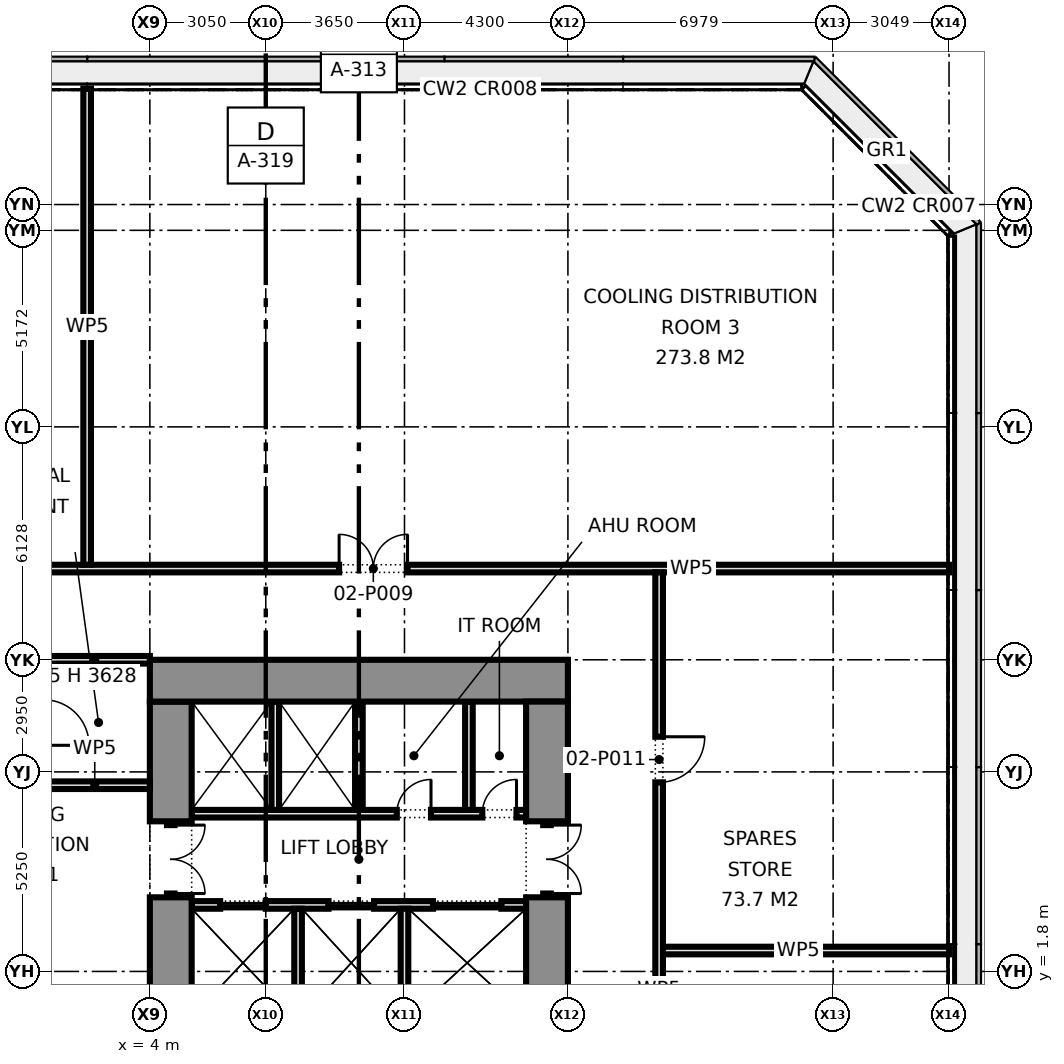
"""IFC4 building model, lengths in metres.
Left out: names, types, materials, properties, quantities, classifications, styles, units other than length and angle.
Written with IfcOpenShell. Run it as: python <this file> out.ifc"""

import sys

from ifc_helpers import new_model, si_unit, direction, frame, frame_2d, origin, place, context, subcontext, project, spatial, rectangle, extrude, element, fill, save


model = new_model("IFC4")
c1 = context("Model", 3, precision=1e-05, world=origin(), true_north=direction((0.0, 1.0)))
c2 = subcontext(c1, "Body", "Model", "MODEL_VIEW")
j1 = project(units=[si_unit("LENGTHUNIT", "METRE"), si_unit("PLANEANGLEUNIT", "RADIAN")], contexts=[c1])
p1 = place(None, origin())
s1 = spatial("IfcSite", under=j1, at=p1, CompositionType="ELEMENT")
p2 = place(p1, origin())
s2 = spatial("IfcBuilding", under=s1, at=p2, CompositionType="ELEMENT")
p3 = place(p2, frame((0.0, 0.0, 6.5)))
s3 = spatial("IfcBuildingStorey", under=s2, at=p3, CompositionType="ELEMENT", Elevation=6.5)
p4 = place(p3, frame((15.0, 9.45, 0.0), z_axis=(0.0, 0.0, 1.0), x_axis=(-1.0, 0.0, 0.0)))
e1 = element("IfcWall", 1, at=p4, inside=s3, PredefinedType="SHEAR", context=c2, shape_type="SweptSolid", body=[
    extrude(rectangle(XDim=11.0, YDim=1.1, at=frame_2d((5.5, 0.0))), origin(), (0.0, 0.0, 1.0), 4.575),
])
p5 = place(p3, frame((14.45, 8.9, 0.0), z_axis=(0.0, 0.0, 1.0), x_axis=(0.0, -1.0, 0.0)))
e2 = element("IfcWall", 2, at=p5, inside=s3, PredefinedType="SHEAR", context=c2, shape_type="SweptSolid", body=[
    extrude(rectangle(XDim=3.15, YDim=1.1, at=frame_2d((1.575, 0.0))), origin(), (0.0, 0.0, 1.0), 4.575),
])
p6 = place(p3, frame((14.45, 5.75, 0.0), z_axis=(0.0, 0.0, 1.0), x_axis=(0.0, -1.0, 0.0)))
e3 = element("IfcWall", 3, at=p6, inside=s3, PredefinedType="PARTITIONING", context=c2, shape_type="SweptSolid", body=[
    extrude(rectangle(XDim=2.0, YDim=0.2, at=frame_2d((1.0, 0.0))), origin(), (0.0, 0.0, 1.0), 2.4),
])
p7 = place(p6, frame((0.1, 0.0, 0.0)))
e4 = element("IfcOpeningElement", 4, at=p7, cuts=e3, PredefinedType="OPENING", context=c2, shape_type="SweptSolid", body=[
    extrude(rectangle(XDim=1.8, YDim=2.1, at=frame_2d((0.9, 1.05))), frame((0.0, 0.11, 0.0), z_axis=(0.0, -1.0, 0.0), x_axis=(1.0, 0.0, 0.0)), (0.0, 0.0, 1.0), 0.22),
])
p8 = place(p3, frame((14.45, 3.75, 0.0), z_axis=(0.0, 0.0, 1.0), x_axis=(0.0, -1.0, 0.0)))
e5 = element("IfcWall", 5, at=p8, inside=s3, PredefinedType="SHEAR", context=c2, shape_type="SweptSolid", body=[
    extrude(rectangle(XDim=6.13, YDim=1.1, at=frame_2d((3.065, 0.0))), origin(), (0.0, 0.0, 1.0), 4.575),
])
p9 = place(p3, frame((4.55, 8.9, 0.0), z_axis=(0.0, 0.0, 1.0), x_axis=(0.0, -1.0, 0.0)))
e6 = element("IfcWall", 6, at=p9, inside=s3, PredefinedType="SHEAR", context=c2, shape_type="SweptSolid", body=[
    extrude(rectangle(XDim=3.15, YDim=1.1, at=frame_2d((1.575, 0.0))), origin(), (0.0, 0.0, 1.0), 4.575),
])
p10 = place(p3, frame((4.55, 5.75, 0.0), z_axis=(0.0, 0.0, 1.0), x_axis=(0.0, -1.0, 0.0)))
e7 = element("IfcWall", 7, at=p10, inside=s3, PredefinedType="PARTITIONING", context=c2, shape_type="SweptSolid", body=[
    extrude(rectangle(XDim=2.0, YDim=0.2, at=frame_2d((1.0, 0.0))), origin(), (0.0, 0.0, 1.0), 2.4),
])
p11 = place(p10, frame((0.1, 0.0, 0.0)))
e8 = element("IfcOpeningElement", 8, at=p11, cuts=e7, PredefinedType="OPENING", context=c2, shape_type="SweptSolid", body=[
    extrude(rectangle(XDim=1.8, YDim=2.1, at=frame_2d((0.9, 1.05))), frame((0.0, 0.11, 0.0), z_axis=(0.0, -1.0, 0.0), x_axis=(1.0, 0.0, 0.0)), (0.0, 0.0, 1.0), 0.22),
])
p12 = place(p3, frame((4.55, 3.75, 0.0), z_axis=(0.0, 0.0, 1.0), x_axis=(0.0, -1.0, 0.0)))
e9 = element("IfcWall", 9, at=p12, inside=s3, PredefinedType="SHEAR", context=c2, shape_type="SweptSolid", body=[
    extrude(rectangle(XDim=4.0, YDim=1.1, at=frame_2d((2.0, 0.0))), origin(), (0.0, 0.0, 1.0), 4.575),
])
p13 = place(p3, frame((13.9, 5.95, 0.0), z_axis=(0.0, 0.0, 1.0), x_axis=(-1.0, 0.0, 0.0)))
e10 = element("IfcWall", 10, at=p13, inside=s3, PredefinedType="PARTITIONING", context=c2, shape_type="SweptSolid", body=[
    extrude(rectangle(XDim=8.8, YDim=0.2, at=frame_2d((4.4, 0.0))), origin(), (0.0, 0.0, 1.0), 4.575),
])
p14 = place(p13, frame((0.252, 0.0, 0.0)))
e11 = element("IfcOpeningElement", 11, at=p14, cuts=e10, PredefinedType="OPENING", context=c2, shape_type="SweptSolid", body=[
    extrude(rectangle(XDim=0.9, YDim=2.1, at=frame_2d((0.45, 1.05))), frame((0.0, 0.11, 0.0), z_axis=(0.0, -1.0, 0.0), x_axis=(1.0, 0.0, 0.0)), (0.0, 0.0, 1.0), 0.22),
])
p15 = place(p13, frame((2.502, 0.0, 0.0)))
e12 = element("IfcOpeningElement", 12, at=p15, cuts=e10, PredefinedType="OPENING", context=c2, shape_type="SweptSolid", body=[
    extrude(rectangle(XDim=0.9, YDim=2.1, at=frame_2d((0.45, 1.05))), frame((0.0, 0.11, 0.0), z_axis=(0.0, -1.0, 0.0), x_axis=(1.0, 0.0, 0.0)), (0.0, 0.0, 1.0), 0.22),
])
p16 = place(p3, frame((13.9, 3.55, 0.0), z_axis=(0.0, 0.0, 1.0), x_axis=(-1.0, 0.0, 0.0)))
e13 = element("IfcWall", 13, at=p16, inside=s3, PredefinedType="PARTITIONING", context=c2, shape_type="SweptSolid", body=[
    extrude(rectangle(XDim=8.8, YDim=0.2, at=frame_2d((4.4, 0.0))), origin(), (0.0, 0.0, 1.0), 4.575),
])
p17 = place(p16, frame((0.65, 0.0, 0.0)))
e14 = element("IfcOpeningElement", 14, at=p17, cuts=e13, PredefinedType="OPENING", context=c2, shape_type="SweptSolid", body=[
    extrude(rectangle(XDim=1.8, YDim=2.1, at=frame_2d((0.9, 1.05))), frame((0.0, 0.11, 0.0), z_axis=(0.0, -1.0, 0.0), x_axis=(1.0, 0.0, 0.0)), (0.0, 0.0, 1.0), 0.22),
])
p18 = place(p16, frame((4.0, 0.0, 0.0)))
e15 = element("IfcOpeningElement", 15, at=p18, cuts=e13, PredefinedType="OPENING", context=c2, shape_type="SweptSolid", body=[
    extrude(rectangle(XDim=1.2, YDim=2.1, at=frame_2d((0.6, 1.05))), frame((0.0, 0.11, 0.0), z_axis=(0.0, -1.0, 0.0), x_axis=(1.0, 0.0, 0.0)), (0.0, 0.0, 1.0), 0.22),
])
p19 = place(p16, frame((6.85, 0.0, 0.0)))
e16 = element("IfcOpeningElement", 16, at=p19, cuts=e13, PredefinedType="OPENING", context=c2, shape_type="SweptSolid", body=[
    extrude(rectangle(XDim=1.2, YDim=2.1, at=frame_2d((0.6, 1.05))), frame((0.0, 0.11, 0.0), z_axis=(0.0, -1.0, 0.0), x_axis=(1.0, 0.0, 0.0)), (0.0, 0.0, 1.0), 0.22),
])
for number, where, z_axis, x_axis in (
    (17, (9.5, 8.9, 0.0), (0.0, 0.0, 1.0), (0.0, -1.0, 0.0)),
    (18, (7.3, 8.9, 0.0), (0.0, 0.0, 1.0), (0.0, -1.0, 0.0)),
    (19, (12.395, 8.9, 0.0), (0.0, 0.0, 1.0), (0.0, -1.0, 0.0)),
    (20, (10.7, 3.45, 0.0), (0.0, 0.0, 1.0), (0.0, -1.0, 0.0)),
    (21, (7.9, 3.45, 0.0), (0.0, 0.0, 1.0), (0.0, -1.0, 0.0)),
):
    element("IfcWall", number, at=place(p3, frame(where, z_axis=z_axis, x_axis=x_axis)), inside=s3, PredefinedType="PARTITIONING", context=c2, shape_type="SweptSolid", body=[
        extrude(rectangle(XDim=2.85, YDim=0.2, at=frame_2d((1.425, 0.0))), origin(), (0.0, 0.0, 1.0), 4.575),
    ])
p20 = place(p3, frame((17.5, 2.35, 0.0), z_axis=(0.0, 0.0, 1.0), x_axis=(1.0, 0.0, 0.0)))
e22 = element("IfcWall", 22, at=p20, inside=s3, PredefinedType="PARTITIONING", context=c2, shape_type="SweptSolid", body=[
    extrude(rectangle(XDim=7.53, YDim=0.2, at=frame_2d((3.765, 0.0))), origin(), (0.0, 0.0, 1.0), 4.575),
])
p21 = place(p3, frame((1.1, 6.7, 0.0), z_axis=(0.0, 0.0, 1.0), x_axis=(1.0, 0.0, 0.0)))
e23 = element("IfcWall", 23, at=p21, inside=s3, PredefinedType="PARTITIONING", context=c2, shape_type="SweptSolid", body=[
    extrude(rectangle(XDim=2.9, YDim=0.2, at=frame_2d((1.45, 0.0))), origin(), (0.0, 0.0, 1.0), 4.575),
])
p22 = place(p3, frame((1.1, 10.0, 0.0), z_axis=(0.0, 0.0, 1.0), x_axis=(1.0, 0.0, 0.0)))
e24 = element("IfcWall", 24, at=p22, inside=s3, PredefinedType="PARTITIONING", context=c2, shape_type="SweptSolid", body=[
    extrude(rectangle(XDim=2.9, YDim=0.2, at=frame_2d((1.45, 0.0))), origin(), (0.0, 0.0, 1.0), 3.628),
])
p23 = place(p3, frame((-25.03, 12.4, 0.0), z_axis=(0.0, 0.0, 1.0), x_axis=(1.0, 0.0, 0.0)))
e25 = element("IfcWall", 25, at=p23, inside=s3, PredefinedType="PARTITIONING", context=c2, shape_type="SweptSolid", body=[
    extrude(rectangle(XDim=50.06, YDim=0.2, at=frame_2d((25.03, 0.0))), origin(), (0.0, 0.0, 1.0), 4.575),
])
p24 = place(p23, frame((21.18, 0.0, 0.0)))
e26 = element("IfcOpeningElement", 26, at=p24, cuts=e25, PredefinedType="OPENING", context=c2, shape_type="SweptSolid", body=[
    extrude(rectangle(XDim=1.8, YDim=2.1, at=frame_2d((0.9, 1.05))), frame((0.0, 0.11, 0.0), z_axis=(0.0, -1.0, 0.0), x_axis=(1.0, 0.0, 0.0)), (0.0, 0.0, 1.0), 0.22),
])
p25 = place(p23, frame((9.58, 0.0, 0.0)))
e27 = element("IfcOpeningElement", 27, at=p25, cuts=e25, PredefinedType="OPENING", context=c2, shape_type="SweptSolid", body=[
    extrude(rectangle(XDim=1.0, YDim=2.1, at=frame_2d((0.5, 1.05))), frame((0.0, 0.11, 0.0), z_axis=(0.0, -1.0, 0.0), x_axis=(1.0, 0.0, 0.0)), (0.0, 0.0, 1.0), 0.22),
])
p26 = place(p23, frame((12.58, 0.0, 0.0)))
e28 = element("IfcOpeningElement", 28, at=p26, cuts=e25, PredefinedType="OPENING", context=c2, shape_type="SweptSolid", body=[
    extrude(rectangle(XDim=1.0, YDim=2.1, at=frame_2d((0.5, 1.05))), frame((0.0, 0.11, 0.0), z_axis=(0.0, -1.0, 0.0), x_axis=(1.0, 0.0, 0.0)), (0.0, 0.0, 1.0), 0.22),
])
p27 = place(p23, frame((15.18, 0.0, 0.0)))
e29 = element("IfcOpeningElement", 29, at=p27, cuts=e25, PredefinedType="OPENING", context=c2, shape_type="SweptSolid", body=[
    extrude(rectangle(XDim=1.0, YDim=2.1, at=frame_2d((0.5, 1.05))), frame((0.0, 0.11, 0.0), z_axis=(0.0, -1.0, 0.0), x_axis=(1.0, 0.0, 0.0)), (0.0, 0.0, 1.0), 0.22),
])
p28 = place(p23, frame((34.01, 0.0, 0.0)))
e30 = element("IfcOpeningElement", 30, at=p28, cuts=e25, PredefinedType="OPENING", context=c2, shape_type="SweptSolid", body=[
    extrude(rectangle(XDim=1.8, YDim=2.1, at=frame_2d((0.9, 1.05))), frame((0.0, 0.11, 0.0), z_axis=(0.0, -1.0, 0.0), x_axis=(1.0, 0.0, 0.0)), (0.0, 0.0, 1.0), 0.22),
])
p29 = place(p3, frame((17.4, -12.3, 0.0), z_axis=(0.0, 0.0, 1.0), x_axis=(0.0, 1.0, 0.0)))
e31 = element("IfcWall", 31, at=p29, inside=s3, PredefinedType="PARTITIONING", context=c2, shape_type="SweptSolid", body=[
    extrude(rectangle(XDim=24.6, YDim=0.2, at=frame_2d((12.3, 0.0))), origin(), (0.0, 0.0, 1.0), 4.575),
])
p30 = place(p29, frame((6.375, 0.0, 0.0)))
e32 = element("IfcOpeningElement", 32, at=p30, cuts=e31, PredefinedType="OPENING", context=c2, shape_type="SweptSolid", body=[
    extrude(rectangle(XDim=1.8, YDim=2.1, at=frame_2d((0.9, 1.05))), frame((0.0, 0.11, 0.0), z_axis=(0.0, -1.0, 0.0), x_axis=(1.0, 0.0, 0.0)), (0.0, 0.0, 1.0), 0.22),
])
p31 = place(p29, frame((19.075, 0.0, 0.0)))
e33 = element("IfcOpeningElement", 33, at=p31, cuts=e31, PredefinedType="OPENING", context=c2, shape_type="SweptSolid", body=[
    extrude(rectangle(XDim=1.2, YDim=2.1, at=frame_2d((0.6, 1.05))), frame((0.0, 0.11, 0.0), z_axis=(0.0, -1.0, 0.0), x_axis=(1.0, 0.0, 0.0)), (0.0, 0.0, 1.0), 0.22),
])
p32 = place(p3, frame((2.35, 12.5, 0.0), z_axis=(0.0, 0.0, 1.0), x_axis=(0.0, 1.0, 0.0)))
e34 = element("IfcWall", 34, at=p32, inside=s3, PredefinedType="PARTITIONING", context=c2, shape_type="SweptSolid", body=[
    extrude(rectangle(XDim=12.53, YDim=0.2, at=frame_2d((6.265, 0.0))), origin(), (0.0, 0.0, 1.0), 4.575),
])
p33 = place(p7, origin())
e35 = element("IfcDoor", 35, at=p33, inside=s3, OperationType="DOUBLE_DOOR_SINGLE_SWING", PredefinedType="DOOR", context=c2, shape_type="SweptSolid", body=[
    extrude(rectangle(XDim=1.8, YDim=2.1, at=frame_2d((0.9, 1.05))), frame((0.0, 0.025, 0.0), z_axis=(0.0, -1.0, 0.0), x_axis=(1.0, 0.0, 0.0)), (0.0, 0.0, 1.0), 0.05),
])
fill(e4, e35)
p34 = place(p11, origin())
e36 = element("IfcDoor", 36, at=p34, inside=s3, OperationType="DOUBLE_DOOR_SINGLE_SWING", PredefinedType="DOOR", context=c2, shape_type="SweptSolid", body=[
    extrude(rectangle(XDim=1.8, YDim=2.1, at=frame_2d((0.9, 1.05))), frame((0.0, 0.025, 0.0), z_axis=(0.0, -1.0, 0.0), x_axis=(1.0, 0.0, 0.0)), (0.0, 0.0, 1.0), 0.05),
])
fill(e8, e36)
p35 = place(p17, origin())
e37 = element("IfcDoor", 37, at=p35, inside=s3, OperationType="DOUBLE_DOOR_SLIDING", PredefinedType="DOOR", context=c2, shape_type="SweptSolid", body=[
    extrude(rectangle(XDim=1.8, YDim=2.1, at=frame_2d((0.9, 1.05))), frame((0.0, 0.025, 0.0), z_axis=(0.0, -1.0, 0.0), x_axis=(1.0, 0.0, 0.0)), (0.0, 0.0, 1.0), 0.05),
])
fill(e14, e37)
p36 = place(p18, origin())
e38 = element("IfcDoor", 38, at=p36, inside=s3, OperationType="DOUBLE_DOOR_SLIDING", PredefinedType="DOOR", context=c2, shape_type="SweptSolid", body=[
    extrude(rectangle(XDim=1.2, YDim=2.1, at=frame_2d((0.6, 1.05))), frame((0.0, 0.025, 0.0), z_axis=(0.0, -1.0, 0.0), x_axis=(1.0, 0.0, 0.0)), (0.0, 0.0, 1.0), 0.05),
])
fill(e15, e38)
p37 = place(p19, origin())
e39 = element("IfcDoor", 39, at=p37, inside=s3, OperationType="DOUBLE_DOOR_SLIDING", PredefinedType="DOOR", context=c2, shape_type="SweptSolid", body=[
    extrude(rectangle(XDim=1.2, YDim=2.1, at=frame_2d((0.6, 1.05))), frame((0.0, 0.025, 0.0), z_axis=(0.0, -1.0, 0.0), x_axis=(1.0, 0.0, 0.0)), (0.0, 0.0, 1.0), 0.05),
])
fill(e16, e39)
p38 = place(p14, frame((0.9, 0.0, 0.0), z_axis=(0.0, 0.0, 1.0), x_axis=(-1.0, 0.0, 0.0)))
e40 = element("IfcDoor", 40, at=p38, inside=s3, OperationType="SINGLE_SWING_RIGHT", PredefinedType="DOOR", context=c2, shape_type="SweptSolid", body=[
    extrude(rectangle(XDim=0.9, YDim=2.1, at=frame_2d((0.45, 1.05))), frame((0.0, 0.025, 0.0), z_axis=(0.0, -1.0, 0.0), x_axis=(1.0, 0.0, 0.0)), (0.0, 0.0, 1.0), 0.05),
])
fill(e11, e40)
p39 = place(p15, frame((0.9, 0.0, 0.0), z_axis=(0.0, 0.0, 1.0), x_axis=(-1.0, 0.0, 0.0)))
e41 = element("IfcDoor", 41, at=p39, inside=s3, OperationType="SINGLE_SWING_RIGHT", PredefinedType="DOOR", context=c2, shape_type="SweptSolid", body=[
    extrude(rectangle(XDim=0.9, YDim=2.1, at=frame_2d((0.45, 1.05))), frame((0.0, 0.025, 0.0), z_axis=(0.0, -1.0, 0.0), x_axis=(1.0, 0.0, 0.0)), (0.0, 0.0, 1.0), 0.05),
])
fill(e12, e41)
p40 = place(p28, origin())
e42 = element("IfcDoor", 42, at=p40, inside=s3, OperationType="DOUBLE_DOOR_SINGLE_SWING", PredefinedType="DOOR", context=c2, shape_type="SweptSolid", body=[
    extrude(rectangle(XDim=1.8, YDim=2.1, at=frame_2d((0.9, 1.05))), frame((0.0, 0.025, 0.0), z_axis=(0.0, -1.0, 0.0), x_axis=(1.0, 0.0, 0.0)), (0.0, 0.0, 1.0), 0.05),
])
fill(e30, e42)
p41 = place(p31, frame((1.2, 0.0, 0.0), z_axis=(0.0, 0.0, 1.0), x_axis=(-1.0, 0.0, 0.0)))
e43 = element("IfcDoor", 43, at=p41, inside=s3, OperationType="SINGLE_SWING_LEFT", PredefinedType="DOOR", context=c2, shape_type="SweptSolid", body=[
    extrude(rectangle(XDim=1.2, YDim=2.1, at=frame_2d((0.6, 1.05))), frame((0.0, 0.025, 0.0), z_axis=(0.0, -1.0, 0.0), x_axis=(1.0, 0.0, 0.0)), (0.0, 0.0, 1.0), 0.05),
])
fill(e33, e43)
save(model, sys.argv[1])
